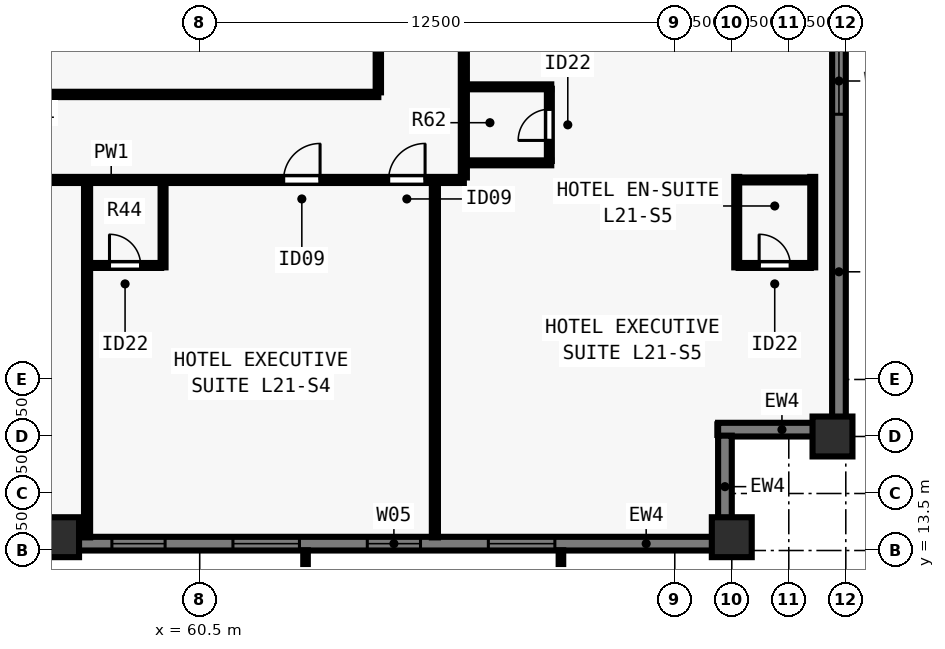
"""IFC4 building model, lengths in metres.
Left out: names, types, materials, properties, quantities, classifications, styles, units other than length and angle.
Written with IfcOpenShell. Run it as: python <this file> out.ifc"""

import sys

from ifc_helpers import new_model, si_unit, direction, frame, frame_2d, origin, origin_2d, place, context, subcontext, project, spatial, rectangle, extrude, element, fill, save


model = new_model("IFC4")
c1 = context("Model", 3, precision=1e-05, world=origin(), true_north=direction((0.0, 1.0)))
c2 = subcontext(c1, "Body", "Model", "MODEL_VIEW")
j1 = project(units=[si_unit("LENGTHUNIT", "METRE"), si_unit("PLANEANGLEUNIT", "RADIAN")], contexts=[c1])
p1 = place(None, origin())
s1 = spatial("IfcSite", under=j1, at=p1, CompositionType="ELEMENT")
p2 = place(p1, origin())
s2 = spatial("IfcBuilding", under=s1, at=p2, CompositionType="ELEMENT")
p3 = place(p2, frame((0.0, 0.0, 79.5)))
s3 = spatial("IfcBuildingStorey", under=s2, at=p3, CompositionType="ELEMENT", Elevation=79.5)
for number, where, z_axis, x_axis in (
    (1, (56.8, 13.85, 0.0), (0.0, 0.0, 1.0), (1.0, 0.0, 0.0)),
    (2, (74.5, 13.85, 0.0), (0.0, 0.0, 1.0), (1.0, 0.0, 0.0)),
    (3, (77.15, 16.5, 0.0), (0.0, 0.0, 1.0), (0.0, 1.0, 0.0)),
):
    element("IfcColumn", number, at=place(p3, frame(where, z_axis=z_axis, x_axis=x_axis)), inside=s3, PredefinedType="COLUMN", context=c2, shape_type="SweptSolid", body=[
        extrude(rectangle(XDim=1.05, YDim=1.05, at=origin_2d()), origin(), (0.0, 0.0, 1.0), 3.5),
    ])
p4 = place(p3, frame((77.32, 45.2, 0.0), z_axis=(0.0, 0.0, 1.0), x_axis=(0.0, -1.0, 0.0)))
e4 = element("IfcWall", 4, at=p4, inside=s3, PredefinedType="SOLIDWALL", context=c2, shape_type="SweptSolid", body=[
    extrude(rectangle(XDim=28.362, YDim=0.36, at=frame_2d((14.181, 0.0))), origin(), (0.0, 0.0, 1.0), 3.28),
])
p5 = place(p4, frame((4.247, 0.0, 0.8)))
e5 = element("IfcOpeningElement", 5, at=p5, cuts=e4, PredefinedType="OPENING", context=c2, shape_type="SweptSolid", body=[
    extrude(rectangle(XDim=1.75, YDim=1.544, at=frame_2d((0.875, 0.772))), frame((0.0, 0.19, 0.0), z_axis=(0.0, -1.0, 0.0), x_axis=(1.0, 0.0, 0.0)), (0.0, 0.0, 1.0), 0.38),
])
p6 = place(p4, frame((8.315, 0.0, 0.8)))
e6 = element("IfcOpeningElement", 6, at=p6, cuts=e4, PredefinedType="OPENING", context=c2, shape_type="SweptSolid", body=[
    extrude(rectangle(XDim=1.4, YDim=1.544, at=frame_2d((0.7, 0.772))), frame((0.0, 0.19, 0.0), z_axis=(0.0, -1.0, 0.0), x_axis=(1.0, 0.0, 0.0)), (0.0, 0.0, 1.0), 0.38),
])
p7 = place(p4, frame((12.034, 0.0, 0.8)))
e7 = element("IfcOpeningElement", 7, at=p7, cuts=e4, PredefinedType="OPENING", context=c2, shape_type="SweptSolid", body=[
    extrude(rectangle(XDim=1.75, YDim=1.544, at=frame_2d((0.875, 0.772))), frame((0.0, 0.19, 0.0), z_axis=(0.0, -1.0, 0.0), x_axis=(1.0, 0.0, 0.0)), (0.0, 0.0, 1.0), 0.38),
])
p8 = place(p4, frame((15.203, 0.0, 0.8)))
e8 = element("IfcOpeningElement", 8, at=p8, cuts=e4, PredefinedType="OPENING", context=c2, shape_type="SweptSolid", body=[
    extrude(rectangle(XDim=1.4, YDim=1.544, at=frame_2d((0.7, 0.772))), frame((0.0, 0.19, 0.0), z_axis=(0.0, -1.0, 0.0), x_axis=(1.0, 0.0, 0.0)), (0.0, 0.0, 1.0), 0.38),
])
p9 = place(p4, frame((18.471, 0.0, 0.8)))
e9 = element("IfcOpeningElement", 9, at=p9, cuts=e4, PredefinedType="OPENING", context=c2, shape_type="SweptSolid", body=[
    extrude(rectangle(XDim=1.75, YDim=1.544, at=frame_2d((0.875, 0.772))), frame((0.0, 0.19, 0.0), z_axis=(0.0, -1.0, 0.0), x_axis=(1.0, 0.0, 0.0)), (0.0, 0.0, 1.0), 0.38),
])
p10 = place(p3, frame((77.5, 16.68, 0.0), z_axis=(0.0, 0.0, 1.0), x_axis=(-1.0, 0.0, 0.0)))
e10 = element("IfcWall", 10, at=p10, inside=s3, PredefinedType="SOLIDWALL", context=c2, shape_type="SweptSolid", body=[
    extrude(rectangle(XDim=3.36, YDim=0.36, at=frame_2d((1.68, 0.0))), origin(), (0.0, 0.0, 1.0), 3.28),
])
p11 = place(p3, frame((74.32, 16.522, 0.0), z_axis=(0.0, 0.0, 1.0), x_axis=(0.0, -1.0, 0.0)))
e11 = element("IfcWall", 11, at=p11, inside=s3, PredefinedType="SOLIDWALL", context=c2, shape_type="SweptSolid", body=[
    extrude(rectangle(XDim=2.684, YDim=0.36, at=frame_2d((1.342, 0.0))), origin(), (0.0, 0.0, 1.0), 3.28),
])
p12 = place(p3, frame((74.5, 13.68, 0.0), z_axis=(0.0, 0.0, 1.0), x_axis=(-1.0, 0.0, 0.0)))
e12 = element("IfcWall", 12, at=p12, inside=s3, PredefinedType="SOLIDWALL", context=c2, shape_type="SweptSolid", body=[
    extrude(rectangle(XDim=44.662, YDim=0.36, at=frame_2d((22.331, 0.0))), origin(), (0.0, 0.0, 1.0), 3.28),
])
p13 = place(p12, frame((4.655, 0.0, 0.8)))
e13 = element("IfcOpeningElement", 13, at=p13, cuts=e12, PredefinedType="OPENING", context=c2, shape_type="SweptSolid", body=[
    extrude(rectangle(XDim=1.75, YDim=1.544, at=frame_2d((0.875, 0.772))), frame((0.0, 0.19, 0.0), z_axis=(0.0, -1.0, 0.0), x_axis=(1.0, 0.0, 0.0)), (0.0, 0.0, 1.0), 0.38),
])
p14 = place(p12, frame((8.19, 0.0, 0.8)))
e14 = element("IfcOpeningElement", 14, at=p14, cuts=e12, PredefinedType="OPENING", context=c2, shape_type="SweptSolid", body=[
    extrude(rectangle(XDim=1.4, YDim=1.544, at=frame_2d((0.7, 0.772))), frame((0.0, 0.19, 0.0), z_axis=(0.0, -1.0, 0.0), x_axis=(1.0, 0.0, 0.0)), (0.0, 0.0, 1.0), 0.38),
])
p15 = place(p12, frame((11.375, 0.0, 0.8)))
e15 = element("IfcOpeningElement", 15, at=p15, cuts=e12, PredefinedType="OPENING", context=c2, shape_type="SweptSolid", body=[
    extrude(rectangle(XDim=1.75, YDim=1.544, at=frame_2d((0.875, 0.772))), frame((0.0, 0.19, 0.0), z_axis=(0.0, -1.0, 0.0), x_axis=(1.0, 0.0, 0.0)), (0.0, 0.0, 1.0), 0.38),
])
p16 = place(p12, frame((14.911, 0.0, 0.8)))
e16 = element("IfcOpeningElement", 16, at=p16, cuts=e12, PredefinedType="OPENING", context=c2, shape_type="SweptSolid", body=[
    extrude(rectangle(XDim=1.4, YDim=1.544, at=frame_2d((0.7, 0.772))), frame((0.0, 0.19, 0.0), z_axis=(0.0, -1.0, 0.0), x_axis=(1.0, 0.0, 0.0)), (0.0, 0.0, 1.0), 0.38),
])
p17 = place(p12, frame((18.546, 0.0, 0.8)))
e17 = element("IfcOpeningElement", 17, at=p17, cuts=e12, PredefinedType="OPENING", context=c2, shape_type="SweptSolid", body=[
    extrude(rectangle(XDim=1.75, YDim=1.544, at=frame_2d((0.875, 0.772))), frame((0.0, 0.19, 0.0), z_axis=(0.0, -1.0, 0.0), x_axis=(1.0, 0.0, 0.0)), (0.0, 0.0, 1.0), 0.38),
])
p18 = place(p12, frame((21.631, 0.0, 0.8)))
e18 = element("IfcOpeningElement", 18, at=p18, cuts=e12, PredefinedType="OPENING", context=c2, shape_type="SweptSolid", body=[
    extrude(rectangle(XDim=1.4, YDim=1.544, at=frame_2d((0.7, 0.772))), frame((0.0, 0.19, 0.0), z_axis=(0.0, -1.0, 0.0), x_axis=(1.0, 0.0, 0.0)), (0.0, 0.0, 1.0), 0.38),
])
p19 = place(p12, frame((24.366, 0.0, 0.8)))
e19 = element("IfcOpeningElement", 19, at=p19, cuts=e12, PredefinedType="OPENING", context=c2, shape_type="SweptSolid", body=[
    extrude(rectangle(XDim=1.75, YDim=1.544, at=frame_2d((0.875, 0.772))), frame((0.0, 0.19, 0.0), z_axis=(0.0, -1.0, 0.0), x_axis=(1.0, 0.0, 0.0)), (0.0, 0.0, 1.0), 0.38),
])
p20 = place(p12, frame((28.351, 0.0, 0.8)))
e20 = element("IfcOpeningElement", 20, at=p20, cuts=e12, PredefinedType="OPENING", context=c2, shape_type="SweptSolid", body=[
    extrude(rectangle(XDim=1.4, YDim=1.544, at=frame_2d((0.7, 0.772))), frame((0.0, 0.19, 0.0), z_axis=(0.0, -1.0, 0.0), x_axis=(1.0, 0.0, 0.0)), (0.0, 0.0, 1.0), 0.38),
])
p21 = place(p12, frame((31.537, 0.0, 0.8)))
e21 = element("IfcOpeningElement", 21, at=p21, cuts=e12, PredefinedType="OPENING", context=c2, shape_type="SweptSolid", body=[
    extrude(rectangle(XDim=1.75, YDim=1.544, at=frame_2d((0.875, 0.772))), frame((0.0, 0.19, 0.0), z_axis=(0.0, -1.0, 0.0), x_axis=(1.0, 0.0, 0.0)), (0.0, 0.0, 1.0), 0.38),
])
p22 = place(p12, frame((35.072, 0.0, 0.8)))
e22 = element("IfcOpeningElement", 22, at=p22, cuts=e12, PredefinedType="OPENING", context=c2, shape_type="SweptSolid", body=[
    extrude(rectangle(XDim=1.4, YDim=1.544, at=frame_2d((0.7, 0.772))), frame((0.0, 0.19, 0.0), z_axis=(0.0, -1.0, 0.0), x_axis=(1.0, 0.0, 0.0)), (0.0, 0.0, 1.0), 0.38),
])
p23 = place(p12, frame((38.257, 0.0, 0.8)))
e23 = element("IfcOpeningElement", 23, at=p23, cuts=e12, PredefinedType="OPENING", context=c2, shape_type="SweptSolid", body=[
    extrude(rectangle(XDim=1.75, YDim=1.544, at=frame_2d((0.875, 0.772))), frame((0.0, 0.19, 0.0), z_axis=(0.0, -1.0, 0.0), x_axis=(1.0, 0.0, 0.0)), (0.0, 0.0, 1.0), 0.38),
])
p24 = place(p3, frame((36.55, 23.25, 0.0), z_axis=(0.0, 0.0, 1.0), x_axis=(1.0, 0.0, 0.0)))
e24 = element("IfcWall", 24, at=p24, inside=s3, PredefinedType="PARTITIONING", context=c2, shape_type="SweptSolid", body=[
    extrude(rectangle(XDim=30.9, YDim=0.16, at=frame_2d((15.45, 0.0))), origin(), (0.0, 0.0, 1.0), 3.28),
])
p25 = place(p24, frame((1.13, 0.0, 0.0)))
e25 = element("IfcOpeningElement", 25, at=p25, cuts=e24, PredefinedType="OPENING", context=c2, shape_type="SweptSolid", body=[
    extrude(rectangle(XDim=0.96, YDim=2.15, at=frame_2d((0.48, 1.075))), frame((0.0, 0.09, 0.0), z_axis=(0.0, -1.0, 0.0), x_axis=(1.0, 0.0, 0.0)), (0.0, 0.0, 1.0), 0.18),
])
p26 = place(p24, frame((6.093, 0.0, 0.0)))
e26 = element("IfcOpeningElement", 26, at=p26, cuts=e24, PredefinedType="OPENING", context=c2, shape_type="SweptSolid", body=[
    extrude(rectangle(XDim=0.96, YDim=2.15, at=frame_2d((0.48, 1.075))), frame((0.0, 0.09, 0.0), z_axis=(0.0, -1.0, 0.0), x_axis=(1.0, 0.0, 0.0)), (0.0, 0.0, 1.0), 0.18),
])
p27 = place(p24, frame((16.125, 0.0, 0.0)))
e27 = element("IfcOpeningElement", 27, at=p27, cuts=e24, PredefinedType="OPENING", context=c2, shape_type="SweptSolid", body=[
    extrude(rectangle(XDim=0.96, YDim=2.15, at=frame_2d((0.48, 1.075))), frame((0.0, 0.09, 0.0), z_axis=(0.0, -1.0, 0.0), x_axis=(1.0, 0.0, 0.0)), (0.0, 0.0, 1.0), 0.18),
])
p28 = place(p24, frame((26.157, 0.0, 0.0)))
e28 = element("IfcOpeningElement", 28, at=p28, cuts=e24, PredefinedType="OPENING", context=c2, shape_type="SweptSolid", body=[
    extrude(rectangle(XDim=0.96, YDim=2.15, at=frame_2d((0.48, 1.075))), frame((0.0, 0.09, 0.0), z_axis=(0.0, -1.0, 0.0), x_axis=(1.0, 0.0, 0.0)), (0.0, 0.0, 1.0), 0.18),
])
p29 = place(p24, frame((28.92, 0.0, 0.0)))
e29 = element("IfcOpeningElement", 29, at=p29, cuts=e24, PredefinedType="OPENING", context=c2, shape_type="SweptSolid", body=[
    extrude(rectangle(XDim=0.96, YDim=2.15, at=frame_2d((0.48, 1.075))), frame((0.0, 0.09, 0.0), z_axis=(0.0, -1.0, 0.0), x_axis=(1.0, 0.0, 0.0)), (0.0, 0.0, 1.0), 0.18),
])
p30 = place(p3, frame((67.45, 23.315, 0.0), z_axis=(0.0, 0.0, 1.0), x_axis=(0.0, 1.0, 0.0)))
e30 = element("IfcWall", 30, at=p30, inside=s3, PredefinedType="PARTITIONING", context=c2, shape_type="SweptSolid", body=[
    extrude(rectangle(XDim=31.37, YDim=0.16, at=frame_2d((15.685, 0.0))), origin(), (0.0, 0.0, 1.0), 3.28),
])
p31 = place(p30, frame((8.474, 0.0, 0.0)))
e31 = element("IfcOpeningElement", 31, at=p31, cuts=e30, PredefinedType="OPENING", context=c2, shape_type="SweptSolid", body=[
    extrude(rectangle(XDim=0.96, YDim=2.15, at=frame_2d((0.48, 1.075))), frame((0.0, 0.09, 0.0), z_axis=(0.0, -1.0, 0.0), x_axis=(1.0, 0.0, 0.0)), (0.0, 0.0, 1.0), 0.18),
])
p32 = place(p30, frame((23.974, 0.0, 0.0)))
e32 = element("IfcOpeningElement", 32, at=p32, cuts=e30, PredefinedType="OPENING", context=c2, shape_type="SweptSolid", body=[
    extrude(rectangle(XDim=0.96, YDim=2.15, at=frame_2d((0.48, 1.075))), frame((0.0, 0.09, 0.0), z_axis=(0.0, -1.0, 0.0), x_axis=(1.0, 0.0, 0.0)), (0.0, 0.0, 1.0), 0.18),
])
p33 = place(p3, frame((38.8, 25.5, 0.0), z_axis=(0.0, 0.0, 1.0), x_axis=(1.0, 0.0, 0.0)))
e33 = element("IfcWall", 33, at=p33, inside=s3, PredefinedType="PARTITIONING", context=c2, shape_type="SweptSolid", body=[
    extrude(rectangle(XDim=26.4, YDim=0.14, at=frame_2d((13.2, 0.0))), origin(), (0.0, 0.0, 1.0), 3.28),
])
p34 = place(p33, frame((2.2, 0.0, 0.0)))
e34 = element("IfcOpeningElement", 34, at=p34, cuts=e33, PredefinedType="OPENING", context=c2, shape_type="SweptSolid", body=[
    extrude(rectangle(XDim=0.96, YDim=2.12, at=frame_2d((0.48, 1.06))), frame((0.0, 0.08, 0.0), z_axis=(0.0, -1.0, 0.0), x_axis=(1.0, 0.0, 0.0)), (0.0, 0.0, 1.0), 0.16),
])
p35 = place(p33, frame((15.2, 0.0, 0.0)))
e35 = element("IfcOpeningElement", 35, at=p35, cuts=e33, PredefinedType="OPENING", context=c2, shape_type="SweptSolid", body=[
    extrude(rectangle(XDim=0.96, YDim=2.12, at=frame_2d((0.48, 1.06))), frame((0.0, 0.08, 0.0), z_axis=(0.0, -1.0, 0.0), x_axis=(1.0, 0.0, 0.0)), (0.0, 0.0, 1.0), 0.16),
])
p36 = place(p3, frame((65.2, 25.555, 0.0), z_axis=(0.0, 0.0, 1.0), x_axis=(0.0, 1.0, 0.0)))
e36 = element("IfcWall", 36, at=p36, inside=s3, PredefinedType="PARTITIONING", context=c2, shape_type="SweptSolid", body=[
    extrude(rectangle(XDim=13.195, YDim=0.14, at=frame_2d((6.598, 0.0))), origin(), (0.0, 0.0, 1.0), 3.28),
])
p37 = place(p36, frame((2.445, 0.0, 0.0)))
e37 = element("IfcOpeningElement", 37, at=p37, cuts=e36, PredefinedType="OPENING", context=c2, shape_type="SweptSolid", body=[
    extrude(rectangle(XDim=0.88, YDim=2.1, at=frame_2d((0.44, 1.05))), frame((0.0, 0.08, 0.0), z_axis=(0.0, -1.0, 0.0), x_axis=(1.0, 0.0, 0.0)), (0.0, 0.0, 1.0), 0.16),
])
p38 = place(p3, frame((57.536, 13.845, 0.0), z_axis=(0.0, 0.0, 1.0), x_axis=(0.0, 1.0, 0.0)))
e38 = element("IfcWall", 38, at=p38, inside=s3, PredefinedType="PARTITIONING", context=c2, shape_type="SweptSolid", body=[
    extrude(rectangle(XDim=9.34, YDim=0.16, at=frame_2d((4.67, 0.0))), origin(), (0.0, 0.0, 1.0), 3.28),
])
p39 = place(p3, frame((59.536, 20.95, 0.0), z_axis=(0.0, 0.0, 1.0), x_axis=(0.0, 1.0, 0.0)))
e39 = element("IfcWall", 39, at=p39, inside=s3, PredefinedType="PLUMBINGWALL", context=c2, shape_type="SweptSolid", body=[
    extrude(rectangle(XDim=2.235, YDim=0.13, at=frame_2d((1.118, 0.0))), origin(), (0.0, 0.0, 1.0), 3.28),
])
p40 = place(p3, frame((57.601, 21.0, 0.0), z_axis=(0.0, 0.0, 1.0), x_axis=(1.0, 0.0, 0.0)))
e40 = element("IfcWall", 40, at=p40, inside=s3, PredefinedType="PLUMBINGWALL", context=c2, shape_type="SweptSolid", body=[
    extrude(rectangle(XDim=1.885, YDim=0.13, at=frame_2d((0.942, 0.0))), origin(), (0.0, 0.0, 1.0), 3.28),
])
p41 = place(p40, frame((0.525, 0.0, 0.0)))
e41 = element("IfcOpeningElement", 41, at=p41, cuts=e40, PredefinedType="OPENING", context=c2, shape_type="SweptSolid", body=[
    extrude(rectangle(XDim=0.82, YDim=2.1, at=frame_2d((0.41, 1.05))), frame((0.0, 0.075, 0.0), z_axis=(0.0, -1.0, 0.0), x_axis=(1.0, 0.0, 0.0)), (0.0, 0.0, 1.0), 0.15),
])
p42 = place(p3, frame((66.688, 13.845, 0.0), z_axis=(0.0, 0.0, 1.0), x_axis=(0.0, 1.0, 0.0)))
e42 = element("IfcWall", 42, at=p42, inside=s3, PredefinedType="PARTITIONING", context=c2, shape_type="SweptSolid", body=[
    extrude(rectangle(XDim=9.34, YDim=0.16, at=frame_2d((4.67, 0.0))), origin(), (0.0, 0.0, 1.0), 2.439),
])
for number, where, z_axis, x_axis in (
    (43, (76.63, 20.95, 0.0), (0.0, 0.0, 1.0), (0.0, 1.0, 0.0)),
    (44, (74.63, 20.95, 0.0), (0.0, 0.0, 1.0), (0.0, 1.0, 0.0)),
):
    element("IfcWall", number, at=place(p3, frame(where, z_axis=z_axis, x_axis=x_axis)), inside=s3, PredefinedType="PLUMBINGWALL", context=c2, shape_type="SweptSolid", body=[
        extrude(rectangle(XDim=2.38, YDim=0.13, at=frame_2d((1.19, 0.0))), origin(), (0.0, 0.0, 1.0), 3.28),
    ])
p43 = place(p3, frame((74.68, 21.0, 0.0), z_axis=(0.0, 0.0, 1.0), x_axis=(1.0, 0.0, 0.0)))
e45 = element("IfcWall", 45, at=p43, inside=s3, PredefinedType="PLUMBINGWALL", context=c2, shape_type="SweptSolid", body=[
    extrude(rectangle(XDim=1.9, YDim=0.13, at=frame_2d((0.95, 0.0))), origin(), (0.0, 0.0, 1.0), 3.28),
])
p44 = place(p43, frame((0.54, 0.0, 0.0)))
e46 = element("IfcOpeningElement", 46, at=p44, cuts=e45, PredefinedType="OPENING", context=c2, shape_type="SweptSolid", body=[
    extrude(rectangle(XDim=0.82, YDim=2.1, at=frame_2d((0.41, 1.05))), frame((0.0, 0.075, 0.0), z_axis=(0.0, -1.0, 0.0), x_axis=(1.0, 0.0, 0.0)), (0.0, 0.0, 1.0), 0.15),
])
p45 = place(p3, frame((74.68, 23.25, 0.0), z_axis=(0.0, 0.0, 1.0), x_axis=(1.0, 0.0, 0.0)))
e47 = element("IfcWall", 47, at=p45, inside=s3, PredefinedType="PLUMBINGWALL", context=c2, shape_type="SweptSolid", body=[
    extrude(rectangle(XDim=1.9, YDim=0.13, at=frame_2d((0.95, 0.0))), origin(), (0.0, 0.0, 1.0), 3.28),
])
p46 = place(p3, frame((67.515, 23.7, 0.0), z_axis=(0.0, 0.0, 1.0), x_axis=(1.0, 0.0, 0.0)))
e48 = element("IfcWall", 48, at=p46, inside=s3, PredefinedType="PLUMBINGWALL", context=c2, shape_type="SweptSolid", body=[
    extrude(rectangle(XDim=2.235, YDim=0.13, at=frame_2d((1.118, 0.0))), origin(), (0.0, 0.0, 1.0), 2.849),
])
p47 = place(p3, frame((67.515, 25.7, 0.0), z_axis=(0.0, 0.0, 1.0), x_axis=(1.0, 0.0, 0.0)))
e49 = element("IfcWall", 49, at=p47, inside=s3, PredefinedType="PLUMBINGWALL", context=c2, shape_type="SweptSolid", body=[
    extrude(rectangle(XDim=2.235, YDim=0.13, at=frame_2d((1.118, 0.0))), origin(), (0.0, 0.0, 1.0), 3.28),
])
p48 = place(p3, frame((69.7, 23.75, 0.0), z_axis=(0.0, 0.0, 1.0), x_axis=(0.0, 1.0, 0.0)))
e50 = element("IfcWall", 50, at=p48, inside=s3, PredefinedType="PLUMBINGWALL", context=c2, shape_type="SweptSolid", body=[
    extrude(rectangle(XDim=1.9, YDim=0.13, at=frame_2d((0.95, 0.0))), origin(), (0.0, 0.0, 1.0), 3.28),
])
p49 = place(p48, frame((0.54, 0.0, 0.0)))
e51 = element("IfcOpeningElement", 51, at=p49, cuts=e50, PredefinedType="OPENING", context=c2, shape_type="SweptSolid", body=[
    extrude(rectangle(XDim=0.82, YDim=2.1, at=frame_2d((0.41, 1.05))), frame((0.0, 0.075, 0.0), z_axis=(0.0, -1.0, 0.0), x_axis=(1.0, 0.0, 0.0)), (0.0, 0.0, 1.0), 0.15),
])
p50 = place(p9, origin())
e52 = element("IfcWindow", 52, at=p50, inside=s3, PartitioningType="SINGLE_PANEL", PredefinedType="WINDOW", context=c2, shape_type="SweptSolid", body=[
    extrude(rectangle(XDim=1.75, YDim=1.544, at=frame_2d((0.875, 0.772))), frame((0.0, -0.05, 0.0), z_axis=(0.0, -1.0, 0.0), x_axis=(1.0, 0.0, 0.0)), (0.0, 0.0, 1.0), 0.06),
])
fill(e9, e52)
p51 = place(p13, origin())
e53 = element("IfcWindow", 53, at=p51, inside=s3, PartitioningType="SINGLE_PANEL", PredefinedType="WINDOW", context=c2, shape_type="SweptSolid", body=[
    extrude(rectangle(XDim=1.75, YDim=1.544, at=frame_2d((0.875, 0.772))), frame((0.0, -0.05, 0.0), z_axis=(0.0, -1.0, 0.0), x_axis=(1.0, 0.0, 0.0)), (0.0, 0.0, 1.0), 0.06),
])
fill(e13, e53)
p52 = place(p14, origin())
e54 = element("IfcWindow", 54, at=p52, inside=s3, PartitioningType="SINGLE_PANEL", PredefinedType="WINDOW", context=c2, shape_type="SweptSolid", body=[
    extrude(rectangle(XDim=1.4, YDim=1.544, at=frame_2d((0.7, 0.772))), frame((0.0, -0.05, 0.0), z_axis=(0.0, -1.0, 0.0), x_axis=(1.0, 0.0, 0.0)), (0.0, 0.0, 1.0), 0.06),
])
fill(e14, e54)
p53 = place(p15, origin())
e55 = element("IfcWindow", 55, at=p53, inside=s3, PartitioningType="SINGLE_PANEL", PredefinedType="WINDOW", context=c2, shape_type="SweptSolid", body=[
    extrude(rectangle(XDim=1.75, YDim=1.544, at=frame_2d((0.875, 0.772))), frame((0.0, -0.05, 0.0), z_axis=(0.0, -1.0, 0.0), x_axis=(1.0, 0.0, 0.0)), (0.0, 0.0, 1.0), 0.06),
])
fill(e15, e55)
p54 = place(p16, origin())
e56 = element("IfcWindow", 56, at=p54, inside=s3, PartitioningType="SINGLE_PANEL", PredefinedType="WINDOW", context=c2, shape_type="SweptSolid", body=[
    extrude(rectangle(XDim=1.4, YDim=1.544, at=frame_2d((0.7, 0.772))), frame((0.0, -0.05, 0.0), z_axis=(0.0, -1.0, 0.0), x_axis=(1.0, 0.0, 0.0)), (0.0, 0.0, 1.0), 0.06),
])
fill(e16, e56)
p55 = place(p41, origin())
e57 = element("IfcDoor", 57, at=p55, inside=s3, OperationType="SINGLE_SWING_LEFT", PredefinedType="DOOR", context=c2, shape_type="SweptSolid", body=[
    extrude(rectangle(XDim=0.82, YDim=2.1, at=frame_2d((0.41, 1.05))), frame((0.0, 0.025, 0.0), z_axis=(0.0, -1.0, 0.0), x_axis=(1.0, 0.0, 0.0)), (0.0, 0.0, 1.0), 0.05),
])
fill(e41, e57)
p56 = place(p28, origin())
e58 = element("IfcDoor", 58, at=p56, inside=s3, OperationType="SINGLE_SWING_RIGHT", PredefinedType="DOOR", context=c2, shape_type="SweptSolid", body=[
    extrude(rectangle(XDim=0.96, YDim=2.15, at=frame_2d((0.48, 1.075))), frame((0.0, 0.025, 0.0), z_axis=(0.0, -1.0, 0.0), x_axis=(1.0, 0.0, 0.0)), (0.0, 0.0, 1.0), 0.05),
])
fill(e28, e58)
p57 = place(p44, origin())
e59 = element("IfcDoor", 59, at=p57, inside=s3, OperationType="SINGLE_SWING_LEFT", PredefinedType="DOOR", context=c2, shape_type="SweptSolid", body=[
    extrude(rectangle(XDim=0.82, YDim=2.1, at=frame_2d((0.41, 1.05))), frame((0.0, 0.025, 0.0), z_axis=(0.0, -1.0, 0.0), x_axis=(1.0, 0.0, 0.0)), (0.0, 0.0, 1.0), 0.05),
])
fill(e46, e59)
p58 = place(p29, origin())
e60 = element("IfcDoor", 60, at=p58, inside=s3, OperationType="SINGLE_SWING_RIGHT", PredefinedType="DOOR", context=c2, shape_type="SweptSolid", body=[
    extrude(rectangle(XDim=0.96, YDim=2.15, at=frame_2d((0.48, 1.075))), frame((0.0, 0.025, 0.0), z_axis=(0.0, -1.0, 0.0), x_axis=(1.0, 0.0, 0.0)), (0.0, 0.0, 1.0), 0.05),
])
fill(e29, e60)
p59 = place(p49, origin())
e61 = element("IfcDoor", 61, at=p59, inside=s3, OperationType="SINGLE_SWING_LEFT", PredefinedType="DOOR", context=c2, shape_type="SweptSolid", body=[
    extrude(rectangle(XDim=0.82, YDim=2.1, at=frame_2d((0.41, 1.05))), frame((0.0, 0.025, 0.0), z_axis=(0.0, -1.0, 0.0), x_axis=(1.0, 0.0, 0.0)), (0.0, 0.0, 1.0), 0.05),
])
fill(e51, e61)
save(model, sys.argv[1])
